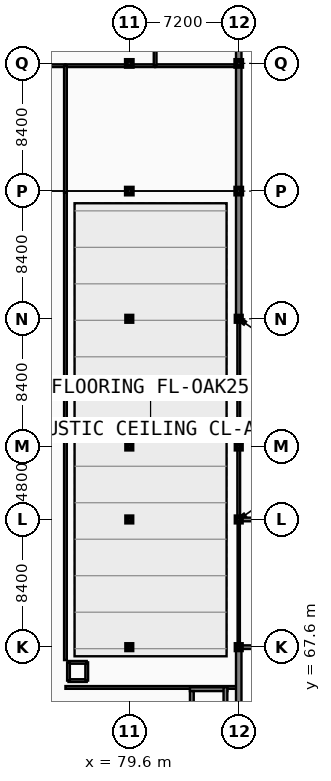
"""IFC4 building model, lengths in metres.
Left out: names, types, materials, properties, quantities, classifications, styles, units other than length and angle.
Written with IfcOpenShell. Run it as: python <this file> out.ifc"""

import sys

from ifc_helpers import new_model, si_unit, direction, frame, frame_2d, origin, origin_2d, place, context, subcontext, project, spatial, rectangle, extrude, element, fill, save


model = new_model("IFC4")
c1 = context("Model", 3, precision=1e-05, world=origin(), true_north=direction((0.0, 1.0)))
c2 = subcontext(c1, "Body", "Model", "MODEL_VIEW")
j1 = project(units=[si_unit("LENGTHUNIT", "METRE"), si_unit("PLANEANGLEUNIT", "RADIAN")], contexts=[c1])
p1 = place(None, origin())
s1 = spatial("IfcSite", under=j1, at=p1, CompositionType="ELEMENT")
p2 = place(p1, origin())
s2 = spatial("IfcBuilding", under=s1, at=p2, CompositionType="ELEMENT")
p3 = place(p2, frame((0.0, 0.0, 13.8)))
s3 = spatial("IfcBuildingStorey", under=s2, at=p3, CompositionType="ELEMENT", Elevation=13.8)
for number, where, z_axis, x_axis in (
    (1, (79.6, 67.6, 0.0), (0.0, 0.0, 1.0), (1.0, 0.0, 0.0)),
    (2, (79.6, 76.0, 0.0), (0.0, 0.0, 1.0), (1.0, 0.0, 0.0)),
    (3, (79.6, 80.8, 0.0), (0.0, 0.0, 1.0), (1.0, 0.0, 0.0)),
    (4, (79.6, 89.2, 0.0), (0.0, 0.0, 1.0), (1.0, 0.0, 0.0)),
):
    element("IfcColumn", number, at=place(p3, frame(where, z_axis=z_axis, x_axis=x_axis)), inside=s3, PredefinedType="COLUMN", context=c2, shape_type="SweptSolid", body=[
        extrude(rectangle(XDim=0.36, YDim=0.36, at=origin_2d()), origin(), (0.0, 0.0, 1.0), 3.9),
    ])
for number, where, z_axis, x_axis in (
    (5, (79.6, 97.6, 0.0), (0.0, 0.0, 1.0), (1.0, 0.0, 0.0)),
    (6, (79.6, 106.0, 0.0), (0.0, 0.0, 1.0), (1.0, 0.0, 0.0)),
):
    element("IfcColumn", number, at=place(p3, frame(where, z_axis=z_axis, x_axis=x_axis)), inside=s3, PredefinedType="COLUMN", context=c2, shape_type="SweptSolid", body=[
        extrude(rectangle(XDim=0.4, YDim=0.4, at=origin_2d()), origin(), (0.0, 0.0, 1.0), 3.9),
    ])
for number, where, z_axis, x_axis in (
    (7, (86.8, 67.6, 0.0), (0.0, 0.0, 1.0), (1.0, 0.0, 0.0)),
    (8, (86.8, 76.0, 0.0), (0.0, 0.0, 1.0), (1.0, 0.0, 0.0)),
    (9, (86.8, 80.8, 0.0), (0.0, 0.0, 1.0), (1.0, 0.0, 0.0)),
    (10, (86.8, 89.2, 0.0), (0.0, 0.0, 1.0), (1.0, 0.0, 0.0)),
):
    element("IfcColumn", number, at=place(p3, frame(where, z_axis=z_axis, x_axis=x_axis)), inside=s3, PredefinedType="COLUMN", context=c2, shape_type="SweptSolid", body=[
        extrude(rectangle(XDim=0.36, YDim=0.36, at=origin_2d()), origin(), (0.0, 0.0, 1.0), 3.9),
    ])
for number, where, z_axis, x_axis in (
    (11, (86.8, 97.6, 0.0), (0.0, 0.0, 1.0), (1.0, 0.0, 0.0)),
    (12, (86.8, 106.0, 0.0), (0.0, 0.0, 1.0), (1.0, 0.0, 0.0)),
):
    element("IfcColumn", number, at=place(p3, frame(where, z_axis=z_axis, x_axis=x_axis)), inside=s3, PredefinedType="COLUMN", context=c2, shape_type="SweptSolid", body=[
        extrude(rectangle(XDim=0.4, YDim=0.4, at=origin_2d()), origin(), (0.0, 0.0, 1.0), 3.9),
    ])
p4 = place(p3, frame((86.8, 67.6, 0.0), z_axis=(0.0, 0.0, 1.0), x_axis=(0.0, 1.0, 0.0)))
e13 = element("IfcWall", 13, at=p4, inside=s3, PredefinedType="PARTITIONING", context=c2, shape_type="SweptSolid", body=[
    extrude(rectangle(XDim=8.4, YDim=0.15, at=frame_2d((4.2, 0.0))), origin(), (0.0, 0.0, 1.0), 3.2),
])
p5 = place(p4, frame((3.7, 0.0, -0.01)))
e14 = element("IfcOpeningElement", 14, at=p5, cuts=e13, PredefinedType="OPENING", context=c2, shape_type="SweptSolid", body=[
    extrude(rectangle(XDim=1.0, YDim=2.16, at=frame_2d((0.5, 1.08))), frame((0.0, 0.085, 0.0), z_axis=(0.0, -1.0, 0.0), x_axis=(1.0, 0.0, 0.0)), (0.0, 0.0, 1.0), 0.17),
])
p6 = place(p3, frame((60.3, 105.85, 0.0), z_axis=(0.0, 0.0, 1.0), x_axis=(1.0, 0.0, 0.0)))
e15 = element("IfcWall", 15, at=p6, inside=s3, PredefinedType="PARTITIONING", context=c2, shape_type="SweptSolid", body=[
    extrude(rectangle(XDim=15.1, YDim=0.18, at=frame_2d((7.55, 0.0))), origin(), (0.0, 0.0, 1.0), 3.15),
])
p7 = place(p6, frame((7.05, 0.0, -0.01)))
e16 = element("IfcOpeningElement", 16, at=p7, cuts=e15, PredefinedType="OPENING", context=c2, shape_type="SweptSolid", body=[
    extrude(rectangle(XDim=1.0, YDim=2.16, at=frame_2d((0.5, 1.08))), frame((0.0, 0.1, 0.0), z_axis=(0.0, -1.0, 0.0), x_axis=(1.0, 0.0, 0.0)), (0.0, 0.0, 1.0), 0.2),
])
p8 = place(p3, frame((75.4, 105.85, 0.0), z_axis=(0.0, 0.0, 1.0), x_axis=(1.0, 0.0, 0.0)))
e17 = element("IfcWall", 17, at=p8, inside=s3, PredefinedType="PARTITIONING", context=c2, shape_type="SweptSolid", body=[
    extrude(rectangle(XDim=5.9, YDim=0.18, at=frame_2d((2.95, 0.0))), origin(), (0.0, 0.0, 1.0), 3.15),
])
p9 = place(p3, frame((81.3, 105.85, 0.0), z_axis=(0.0, 0.0, 1.0), x_axis=(1.0, 0.0, 0.0)))
e18 = element("IfcWall", 18, at=p9, inside=s3, PredefinedType="PARTITIONING", context=c2, shape_type="SweptSolid", body=[
    extrude(rectangle(XDim=5.36, YDim=0.18, at=frame_2d((2.68, 0.0))), origin(), (0.0, 0.0, 1.0), 3.18),
])
p10 = place(p9, frame((2.18, 0.0, -0.01)))
e19 = element("IfcOpeningElement", 19, at=p10, cuts=e18, PredefinedType="OPENING", context=c2, shape_type="SweptSolid", body=[
    extrude(rectangle(XDim=1.0, YDim=2.16, at=frame_2d((0.5, 1.08))), frame((0.0, 0.1, 0.0), z_axis=(0.0, -1.0, 0.0), x_axis=(1.0, 0.0, 0.0)), (0.0, 0.0, 1.0), 0.2),
])
p11 = place(p3, frame((81.3, 105.85, 0.0), z_axis=(0.0, 0.0, 1.0), x_axis=(0.0, 1.0, 0.0)))
e20 = element("IfcWall", 20, at=p11, inside=s3, PredefinedType="PARTITIONING", context=c2, shape_type="SweptSolid", body=[
    extrude(rectangle(XDim=4.15, YDim=0.18, at=frame_2d((2.075, 0.0))), origin(), (0.0, 0.0, 1.0), 3.18),
])
p12 = place(p11, frame((1.575, 0.0, -0.01)))
e21 = element("IfcOpeningElement", 21, at=p12, cuts=e20, PredefinedType="OPENING", context=c2, shape_type="SweptSolid", body=[
    extrude(rectangle(XDim=1.0, YDim=2.16, at=frame_2d((0.5, 1.08))), frame((0.0, 0.1, 0.0), z_axis=(0.0, -1.0, 0.0), x_axis=(1.0, 0.0, 0.0)), (0.0, 0.0, 1.0), 0.2),
])
p13 = place(p3, frame((75.4, 64.95, 0.0), z_axis=(0.0, 0.0, 1.0), x_axis=(1.0, 0.0, 0.0)))
e22 = element("IfcWall", 22, at=p13, inside=s3, PredefinedType="PARTITIONING", context=c2, shape_type="SweptSolid", body=[
    extrude(rectangle(XDim=11.26, YDim=0.18, at=frame_2d((5.63, 0.0))), origin(), (0.0, 0.0, 1.0), 3.17),
])
p14 = place(p3, frame((75.4, 66.75, 0.0), z_axis=(0.0, 0.0, 1.0), x_axis=(0.0, 1.0, 0.0)))
e23 = element("IfcWall", 23, at=p14, inside=s3, PredefinedType="PARTITIONING", context=c2, shape_type="SweptSolid", body=[
    extrude(rectangle(XDim=30.75, YDim=0.18, at=frame_2d((15.375, 0.0))), origin(), (0.0, 0.0, 1.0), 3.2),
])
p15 = place(p14, frame((6.413, 0.0, -0.01)))
e24 = element("IfcOpeningElement", 24, at=p15, cuts=e23, PredefinedType="OPENING", context=c2, shape_type="SweptSolid", body=[
    extrude(rectangle(XDim=1.6, YDim=2.21, at=frame_2d((0.8, 1.105))), frame((0.0, 0.1, 0.0), z_axis=(0.0, -1.0, 0.0), x_axis=(1.0, 0.0, 0.0)), (0.0, 0.0, 1.0), 0.2),
])
p16 = place(p3, frame((75.4, 97.5, 0.0), z_axis=(0.0, 0.0, 1.0), x_axis=(0.0, 1.0, 0.0)))
e25 = element("IfcWall", 25, at=p16, inside=s3, PredefinedType="PARTITIONING", context=c2, shape_type="SweptSolid", body=[
    extrude(rectangle(XDim=8.35, YDim=0.18, at=frame_2d((4.175, 0.0))), origin(), (0.0, 0.0, 1.0), 3.18),
])
p17 = place(p3, frame((86.8, 76.0, 0.0), z_axis=(0.0, 0.0, 1.0), x_axis=(0.0, 1.0, 0.0)))
e26 = element("IfcWall", 26, at=p17, inside=s3, PredefinedType="PARTITIONING", context=c2, shape_type="SweptSolid", body=[
    extrude(rectangle(XDim=13.2, YDim=0.18, at=frame_2d((6.6, 0.0))), origin(), (0.0, 0.0, 1.0), 3.2),
])
p18 = place(p17, frame((5.8, 0.0, -0.01)))
e27 = element("IfcOpeningElement", 27, at=p18, cuts=e26, PredefinedType="OPENING", context=c2, shape_type="SweptSolid", body=[
    extrude(rectangle(XDim=1.6, YDim=2.21, at=frame_2d((0.8, 1.105))), frame((0.0, 0.1, 0.0), z_axis=(0.0, -1.0, 0.0), x_axis=(1.0, 0.0, 0.0)), (0.0, 0.0, 1.0), 0.2),
])
p19 = place(p3, frame((86.8, 97.6, 0.0), z_axis=(0.0, 0.0, 1.0), x_axis=(0.0, 1.0, 0.0)))
e28 = element("IfcWall", 28, at=p19, inside=s3, PredefinedType="SOLIDWALL", context=c2, shape_type="SweptSolid", body=[
    extrude(rectangle(XDim=8.4, YDim=0.36, at=frame_2d((4.2, 0.0))), origin(), (0.0, 0.0, 1.0), 3.18),
])
p20 = place(p19, frame((0.46, 0.0, 0.75)))
e29 = element("IfcOpeningElement", 29, at=p20, cuts=e28, PredefinedType="OPENING", context=c2, shape_type="SweptSolid", body=[
    extrude(rectangle(XDim=1.55, YDim=2.29, at=frame_2d((0.775, 1.145))), frame((0.0, 0.19, 0.0), z_axis=(0.0, -1.0, 0.0), x_axis=(1.0, 0.0, 0.0)), (0.0, 0.0, 1.0), 0.38),
])
p21 = place(p19, frame((6.26, 0.0, 0.75)))
e30 = element("IfcOpeningElement", 30, at=p21, cuts=e28, PredefinedType="OPENING", context=c2, shape_type="SweptSolid", body=[
    extrude(rectangle(XDim=1.55, YDim=2.29, at=frame_2d((0.775, 1.145))), frame((0.0, 0.19, 0.0), z_axis=(0.0, -1.0, 0.0), x_axis=(1.0, 0.0, 0.0)), (0.0, 0.0, 1.0), 0.38),
])
p22 = place(p3, frame((86.8, 106.0, 0.0), z_axis=(0.0, 0.0, 1.0), x_axis=(0.0, 1.0, 0.0)))
e31 = element("IfcWall", 31, at=p22, inside=s3, PredefinedType="SOLIDWALL", context=c2, shape_type="SweptSolid", body=[
    extrude(rectangle(XDim=9.0, YDim=0.36, at=frame_2d((4.5, 0.0))), origin(), (0.0, 0.0, 1.0), 3.18),
])
p23 = place(p22, frame((0.46, 0.0, 0.75)))
e32 = element("IfcOpeningElement", 32, at=p23, cuts=e31, PredefinedType="OPENING", context=c2, shape_type="SweptSolid", body=[
    extrude(rectangle(XDim=1.55, YDim=2.29, at=frame_2d((0.775, 1.145))), frame((0.0, 0.19, 0.0), z_axis=(0.0, -1.0, 0.0), x_axis=(1.0, 0.0, 0.0)), (0.0, 0.0, 1.0), 0.38),
])
p24 = place(p22, frame((6.86, 0.0, 0.75)))
e33 = element("IfcOpeningElement", 33, at=p24, cuts=e31, PredefinedType="OPENING", context=c2, shape_type="SweptSolid", body=[
    extrude(rectangle(XDim=1.55, YDim=2.29, at=frame_2d((0.775, 1.145))), frame((0.0, 0.19, 0.0), z_axis=(0.0, -1.0, 0.0), x_axis=(1.0, 0.0, 0.0)), (0.0, 0.0, 1.0), 0.38),
])
p25 = place(p3, frame((86.8, 59.2, 0.0), z_axis=(0.0, 0.0, 1.0), x_axis=(0.0, 1.0, 0.0)))
e34 = element("IfcWall", 34, at=p25, inside=s3, PredefinedType="SOLIDWALL", context=c2, shape_type="SweptSolid", body=[
    extrude(rectangle(XDim=8.4, YDim=0.36, at=frame_2d((4.2, 0.0))), origin(), (0.0, 0.0, 1.0), 3.2),
])
p26 = place(p25, frame((0.46, 0.0, 0.75)))
e35 = element("IfcOpeningElement", 35, at=p26, cuts=e34, PredefinedType="OPENING", context=c2, shape_type="SweptSolid", body=[
    extrude(rectangle(XDim=1.55, YDim=2.31, at=frame_2d((0.775, 1.155))), frame((0.0, 0.19, 0.0), z_axis=(0.0, -1.0, 0.0), x_axis=(1.0, 0.0, 0.0)), (0.0, 0.0, 1.0), 0.38),
])
p27 = place(p25, frame((6.26, 0.0, 0.75)))
e36 = element("IfcOpeningElement", 36, at=p27, cuts=e34, PredefinedType="OPENING", context=c2, shape_type="SweptSolid", body=[
    extrude(rectangle(XDim=1.55, YDim=2.31, at=frame_2d((0.775, 1.155))), frame((0.0, 0.19, 0.0), z_axis=(0.0, -1.0, 0.0), x_axis=(1.0, 0.0, 0.0)), (0.0, 0.0, 1.0), 0.38),
])
p28 = place(p3, frame((86.8, 89.2, 0.0), z_axis=(0.0, 0.0, 1.0), x_axis=(0.0, 1.0, 0.0)))
e37 = element("IfcWall", 37, at=p28, inside=s3, PredefinedType="SOLIDWALL", context=c2, shape_type="SweptSolid", body=[
    extrude(rectangle(XDim=8.4, YDim=0.36, at=frame_2d((4.2, 0.0))), origin(), (0.0, 0.0, 1.0), 3.2),
])
p29 = place(p28, frame((0.46, 0.0, 0.75)))
e38 = element("IfcOpeningElement", 38, at=p29, cuts=e37, PredefinedType="OPENING", context=c2, shape_type="SweptSolid", body=[
    extrude(rectangle(XDim=1.55, YDim=2.31, at=frame_2d((0.775, 1.155))), frame((0.0, 0.19, 0.0), z_axis=(0.0, -1.0, 0.0), x_axis=(1.0, 0.0, 0.0)), (0.0, 0.0, 1.0), 0.38),
])
p30 = place(p28, frame((6.26, 0.0, 0.75)))
e39 = element("IfcOpeningElement", 39, at=p30, cuts=e37, PredefinedType="OPENING", context=c2, shape_type="SweptSolid", body=[
    extrude(rectangle(XDim=1.55, YDim=2.31, at=frame_2d((0.775, 1.155))), frame((0.0, 0.19, 0.0), z_axis=(0.0, -1.0, 0.0), x_axis=(1.0, 0.0, 0.0)), (0.0, 0.0, 1.0), 0.38),
])
for number, where, z_axis, x_axis in (
    (40, (87.03, 76.159, 0.0), (0.0, 0.0, 1.0), (0.822, 0.569, 0.0)),
    (41, (87.211, 88.915, 0.0), (0.0, 0.0, 1.0), (-0.822, 0.569, 0.0)),
):
    element("IfcWall", number, at=place(p3, frame(where, z_axis=z_axis, x_axis=x_axis)), inside=s3, PredefinedType="SOLIDWALL", context=c2, shape_type="SweptSolid", body=[
        extrude(rectangle(XDim=0.22, YDim=0.24, at=frame_2d((0.11, 0.0))), origin(), (0.0, 0.0, 1.0), 3.2),
    ])
for number, where, z_axis, x_axis in (
    (42, (86.8, 67.6, 0.0), (0.0, 0.0, 1.0), (1.0, 0.0, 0.0)),
    (43, (88.2, 76.0, 0.0), (0.0, 0.0, 1.0), (-1.0, 0.0, 0.0)),
):
    element("IfcWall", number, at=place(p3, frame(where, z_axis=z_axis, x_axis=x_axis)), inside=s3, PredefinedType="SOLIDWALL", context=c2, shape_type="SweptSolid", body=[
        extrude(rectangle(XDim=1.4, YDim=0.24, at=frame_2d((0.7, 0.0))), origin(), (0.0, 0.0, 1.0), 3.2),
    ])
p31 = place(p3, frame((83.59, 64.835, 0.0), z_axis=(0.0, 0.0, 1.0), x_axis=(1.0, 0.0, 0.0)))
e44 = element("IfcWall", 44, at=p31, inside=s3, PredefinedType="SHEAR", context=c2, shape_type="SweptSolid", body=[
    extrude(rectangle(XDim=2.46, YDim=0.25, at=frame_2d((1.23, 0.0))), origin(), (0.0, 0.0, 1.0), 3.9),
])
p32 = place(p3, frame((83.715, 62.25, 0.0), z_axis=(0.0, 0.0, 1.0), x_axis=(0.0, 1.0, 0.0)))
e45 = element("IfcWall", 45, at=p32, inside=s3, PredefinedType="SHEAR", context=c2, shape_type="SweptSolid", body=[
    extrude(rectangle(XDim=2.46, YDim=0.25, at=frame_2d((1.23, 0.0))), origin(), (0.0, 0.0, 1.0), 3.9),
])
p33 = place(p32, frame((0.68, 0.0, -0.01)))
e46 = element("IfcOpeningElement", 46, at=p33, cuts=e45, PredefinedType="OPENING", context=c2, shape_type="SweptSolid", body=[
    extrude(rectangle(XDim=1.1, YDim=2.16, at=frame_2d((0.55, 1.08))), frame((0.0, 0.135, 0.0), z_axis=(0.0, -1.0, 0.0), x_axis=(1.0, 0.0, 0.0)), (0.0, 0.0, 1.0), 0.27),
])
p34 = place(p3, frame((85.925, 62.25, 0.0), z_axis=(0.0, 0.0, 1.0), x_axis=(0.0, 1.0, 0.0)))
e47 = element("IfcWall", 47, at=p34, inside=s3, PredefinedType="SHEAR", context=c2, shape_type="SweptSolid", body=[
    extrude(rectangle(XDim=2.71, YDim=0.25, at=frame_2d((1.355, 0.0))), origin(), (0.0, 0.0, 1.0), 3.9),
])
p35 = place(p3, frame((75.6, 65.4, 0.0), z_axis=(0.0, 0.0, 1.0), x_axis=(1.0, 0.0, 0.0)))
e48 = element("IfcWall", 48, at=p35, inside=s3, PredefinedType="SOLIDWALL", context=c2, shape_type="SweptSolid", body=[
    extrude(rectangle(XDim=1.2, YDim=0.18, at=frame_2d((0.6, 0.0))), origin(), (0.0, 0.0, 1.0), 3.69),
])
p36 = place(p3, frame((76.8, 65.4, 0.0), z_axis=(0.0, 0.0, 1.0), x_axis=(0.0, 1.0, 0.0)))
e49 = element("IfcWall", 49, at=p36, inside=s3, PredefinedType="SOLIDWALL", context=c2, shape_type="SweptSolid", body=[
    extrude(rectangle(XDim=1.2, YDim=0.18, at=frame_2d((0.6, 0.0))), origin(), (0.0, 0.0, 1.0), 3.69),
])
p37 = place(p3, frame((76.8, 66.6, 0.0), z_axis=(0.0, 0.0, 1.0), x_axis=(-1.0, 0.0, 0.0)))
e50 = element("IfcWall", 50, at=p37, inside=s3, PredefinedType="SOLIDWALL", context=c2, shape_type="SweptSolid", body=[
    extrude(rectangle(XDim=1.2, YDim=0.18, at=frame_2d((0.6, 0.0))), origin(), (0.0, 0.0, 1.0), 3.69),
])
p38 = place(p3, frame((75.6, 66.6, 0.0), z_axis=(0.0, 0.0, 1.0), x_axis=(0.0, -1.0, 0.0)))
e51 = element("IfcWall", 51, at=p38, inside=s3, PredefinedType="SOLIDWALL", context=c2, shape_type="SweptSolid", body=[
    extrude(rectangle(XDim=1.2, YDim=0.18, at=frame_2d((0.6, 0.0))), origin(), (0.0, 0.0, 1.0), 3.69),
])
p39 = place(p38, frame((0.2, 0.0, -0.01)))
e52 = element("IfcOpeningElement", 52, at=p39, cuts=e51, PredefinedType="OPENING", context=c2, shape_type="SweptSolid", body=[
    extrude(rectangle(XDim=0.8, YDim=2.06, at=frame_2d((0.4, 1.03))), frame((0.0, 0.1, 0.0), z_axis=(0.0, -1.0, 0.0), x_axis=(1.0, 0.0, 0.0)), (0.0, 0.0, 1.0), 0.2),
])
p40 = place(p5, frame((0.0, 0.0, 0.01)))
e53 = element("IfcDoor", 53, at=p40, inside=s3, OperationType="SINGLE_SWING_RIGHT", PredefinedType="DOOR", context=c2, shape_type="SweptSolid", body=[
    extrude(rectangle(XDim=1.0, YDim=2.15, at=frame_2d((0.5, 1.075))), frame((0.0, 0.025, 0.0), z_axis=(0.0, -1.0, 0.0), x_axis=(1.0, 0.0, 0.0)), (0.0, 0.0, 1.0), 0.05),
])
fill(e14, e53)
p41 = place(p10, frame((0.0, 0.0, 0.01)))
e54 = element("IfcDoor", 54, at=p41, inside=s3, OperationType="SINGLE_SWING_RIGHT", PredefinedType="DOOR", context=c2, shape_type="SweptSolid", body=[
    extrude(rectangle(XDim=1.0, YDim=2.15, at=frame_2d((0.5, 1.075))), frame((0.0, 0.025, 0.0), z_axis=(0.0, -1.0, 0.0), x_axis=(1.0, 0.0, 0.0)), (0.0, 0.0, 1.0), 0.05),
])
fill(e19, e54)
p42 = place(p15, frame((1.6, 0.0, 0.01), z_axis=(0.0, 0.0, 1.0), x_axis=(-1.0, 0.0, 0.0)))
e55 = element("IfcDoor", 55, at=p42, inside=s3, OperationType="DOUBLE_SWING_LEFT", PredefinedType="DOOR", context=c2, shape_type="SweptSolid", body=[
    extrude(rectangle(XDim=1.6, YDim=2.2, at=frame_2d((0.8, 1.1))), frame((0.0, 0.025, 0.0), z_axis=(0.0, -1.0, 0.0), x_axis=(1.0, 0.0, 0.0)), (0.0, 0.0, 1.0), 0.05),
])
fill(e24, e55)
p43 = place(p18, frame((0.0, 0.0, 0.01)))
e56 = element("IfcDoor", 56, at=p43, inside=s3, OperationType="DOUBLE_SWING_LEFT", PredefinedType="DOOR", context=c2, shape_type="SweptSolid", body=[
    extrude(rectangle(XDim=1.6, YDim=2.2, at=frame_2d((0.8, 1.1))), frame((0.0, 0.025, 0.0), z_axis=(0.0, -1.0, 0.0), x_axis=(1.0, 0.0, 0.0)), (0.0, 0.0, 1.0), 0.05),
])
fill(e27, e56)
p44 = place(p20, origin())
e57 = element("IfcWindow", 57, at=p44, inside=s3, PartitioningType="DOUBLE_PANEL_HORIZONTAL", PredefinedType="WINDOW", context=c2, shape_type="SweptSolid", body=[
    extrude(rectangle(XDim=1.55, YDim=2.29, at=frame_2d((0.775, 1.145))), frame((0.0, 0.03, 0.0), z_axis=(0.0, -1.0, 0.0), x_axis=(1.0, 0.0, 0.0)), (0.0, 0.0, 1.0), 0.06),
])
fill(e29, e57)
p45 = place(p21, origin())
e58 = element("IfcWindow", 58, at=p45, inside=s3, PartitioningType="DOUBLE_PANEL_HORIZONTAL", PredefinedType="WINDOW", context=c2, shape_type="SweptSolid", body=[
    extrude(rectangle(XDim=1.55, YDim=2.29, at=frame_2d((0.775, 1.145))), frame((0.0, 0.03, 0.0), z_axis=(0.0, -1.0, 0.0), x_axis=(1.0, 0.0, 0.0)), (0.0, 0.0, 1.0), 0.06),
])
fill(e30, e58)
p46 = place(p23, origin())
e59 = element("IfcWindow", 59, at=p46, inside=s3, PartitioningType="DOUBLE_PANEL_HORIZONTAL", PredefinedType="WINDOW", context=c2, shape_type="SweptSolid", body=[
    extrude(rectangle(XDim=1.55, YDim=2.29, at=frame_2d((0.775, 1.145))), frame((0.0, 0.03, 0.0), z_axis=(0.0, -1.0, 0.0), x_axis=(1.0, 0.0, 0.0)), (0.0, 0.0, 1.0), 0.06),
])
fill(e32, e59)
p47 = place(p27, origin())
e60 = element("IfcWindow", 60, at=p47, inside=s3, PartitioningType="DOUBLE_PANEL_HORIZONTAL", PredefinedType="WINDOW", context=c2, shape_type="SweptSolid", body=[
    extrude(rectangle(XDim=1.55, YDim=2.31, at=frame_2d((0.775, 1.155))), frame((0.0, 0.03, 0.0), z_axis=(0.0, -1.0, 0.0), x_axis=(1.0, 0.0, 0.0)), (0.0, 0.0, 1.0), 0.06),
])
fill(e36, e60)
p48 = place(p29, origin())
e61 = element("IfcWindow", 61, at=p48, inside=s3, PartitioningType="DOUBLE_PANEL_HORIZONTAL", PredefinedType="WINDOW", context=c2, shape_type="SweptSolid", body=[
    extrude(rectangle(XDim=1.55, YDim=2.31, at=frame_2d((0.775, 1.155))), frame((0.0, 0.03, 0.0), z_axis=(0.0, -1.0, 0.0), x_axis=(1.0, 0.0, 0.0)), (0.0, 0.0, 1.0), 0.06),
])
fill(e38, e61)
p49 = place(p30, origin())
e62 = element("IfcWindow", 62, at=p49, inside=s3, PartitioningType="DOUBLE_PANEL_HORIZONTAL", PredefinedType="WINDOW", context=c2, shape_type="SweptSolid", body=[
    extrude(rectangle(XDim=1.55, YDim=2.31, at=frame_2d((0.775, 1.155))), frame((0.0, 0.03, 0.0), z_axis=(0.0, -1.0, 0.0), x_axis=(1.0, 0.0, 0.0)), (0.0, 0.0, 1.0), 0.06),
])
fill(e39, e62)
p50 = place(p39, frame((0.0, 0.0, 0.01)))
e63 = element("IfcDoor", 63, at=p50, inside=s3, OperationType="SINGLE_SWING_LEFT", PredefinedType="DOOR", context=c2, shape_type="SweptSolid", body=[
    extrude(rectangle(XDim=0.8, YDim=2.05, at=frame_2d((0.4, 1.025))), frame((0.0, 0.025, 0.0), z_axis=(0.0, -1.0, 0.0), x_axis=(1.0, 0.0, 0.0)), (0.0, 0.0, 1.0), 0.05),
])
fill(e52, e63)
save(model, sys.argv[1])
